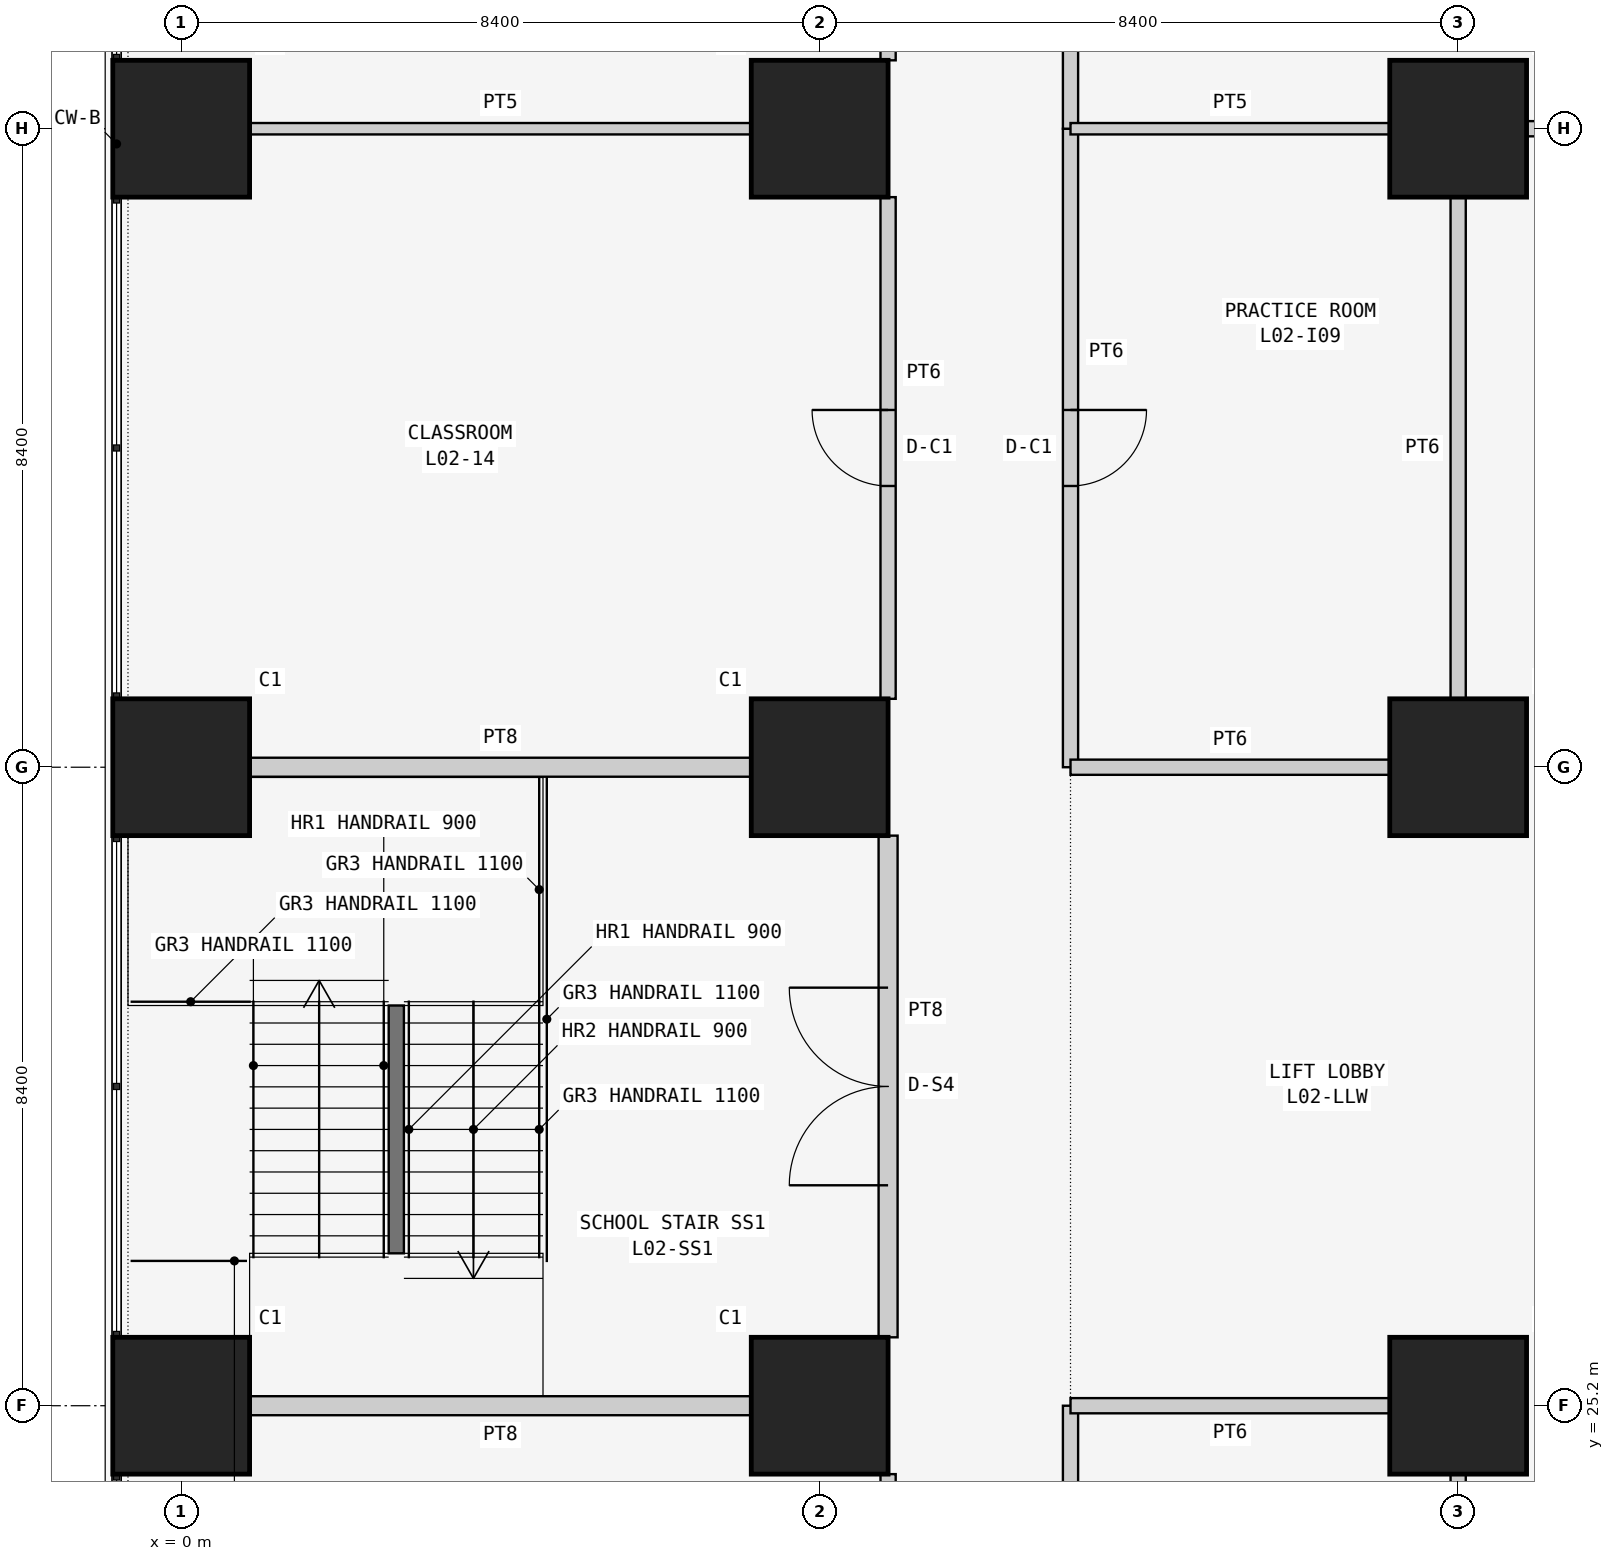
"""IFC4 building model, lengths in metres.
Left out: names, types, materials, properties, quantities, classifications, styles, units other than length and angle.
Written with IfcOpenShell. Run it as: python <this file> out.ifc"""

import sys

from ifc_helpers import new_model, si_unit, direction, frame, frame_2d, origin, origin_2d, place, context, subcontext, project, spatial, rectangle, extrude, element, fill, save


model = new_model("IFC4")
c1 = context("Model", 3, precision=1e-05, world=origin(), true_north=direction((0.0, 1.0)))
c2 = subcontext(c1, "Body", "Model", "MODEL_VIEW")
j1 = project(units=[si_unit("LENGTHUNIT", "METRE"), si_unit("PLANEANGLEUNIT", "RADIAN")], contexts=[c1])
p1 = place(None, origin())
s1 = spatial("IfcSite", under=j1, at=p1, CompositionType="ELEMENT")
p2 = place(p1, origin())
s2 = spatial("IfcBuilding", under=s1, at=p2, CompositionType="ELEMENT")
p3 = place(p2, frame((0.0, 0.0, 10.5)))
s3 = spatial("IfcBuildingStorey", under=s2, at=p3, CompositionType="ELEMENT", Elevation=10.5)
for number, where, z_axis, x_axis in (
    (1, (0.0, 25.2, 0.0), (0.0, 0.0, 1.0), (1.0, 0.0, 0.0)),
    (2, (0.0, 33.6, 0.0), (0.0, 0.0, 1.0), (1.0, 0.0, 0.0)),
    (3, (0.0, 42.0, 0.0), (0.0, 0.0, 1.0), (1.0, 0.0, 0.0)),
    (4, (8.4, 25.2, 0.0), (0.0, 0.0, 1.0), (1.0, 0.0, 0.0)),
    (5, (8.4, 33.6, 0.0), (0.0, 0.0, 1.0), (1.0, 0.0, 0.0)),
    (6, (8.4, 42.0, 0.0), (0.0, 0.0, 1.0), (1.0, 0.0, 0.0)),
    (7, (16.8, 25.2, 0.0), (0.0, 0.0, 1.0), (1.0, 0.0, 0.0)),
    (8, (16.8, 33.6, 0.0), (0.0, 0.0, 1.0), (1.0, 0.0, 0.0)),
    (9, (16.8, 42.0, 0.0), (0.0, 0.0, 1.0), (1.0, 0.0, 0.0)),
):
    element("IfcColumn", number, at=place(p3, frame(where, z_axis=z_axis, x_axis=x_axis)), inside=s3, PredefinedType="COLUMN", context=c2, shape_type="SweptSolid", body=[
        extrude(rectangle(XDim=1.8, YDim=1.8, at=origin_2d()), origin(), (0.0, 0.0, 1.0), 4.5),
    ])
for number, where, z_axis, x_axis in (
    (10, (7.5, 25.2, 0.0), (0.0, 0.0, 1.0), (-1.0, 0.0, 0.0)),
    (11, (0.9, 33.6, 0.0), (0.0, 0.0, 1.0), (1.0, 0.0, 0.0)),
):
    element("IfcWall", number, at=place(p3, frame(where, z_axis=z_axis, x_axis=x_axis)), inside=s3, PredefinedType="SOLIDWALL", context=c2, shape_type="SweptSolid", body=[
        extrude(rectangle(XDim=6.6, YDim=0.25, at=frame_2d((3.3, 0.0))), origin(), (0.0, 0.0, 1.0), 3.543),
    ])
p4 = place(p3, frame((9.3, 32.7, 0.0), z_axis=(0.0, 0.0, 1.0), x_axis=(0.0, -1.0, 0.0)))
e12 = element("IfcWall", 12, at=p4, inside=s3, PredefinedType="SOLIDWALL", context=c2, shape_type="SweptSolid", body=[
    extrude(rectangle(XDim=6.6, YDim=0.25, at=frame_2d((3.3, 0.0))), origin(), (0.0, 0.0, 1.0), 4.3),
])
p5 = place(p4, frame((2.0, 0.0, 0.0)))
e13 = element("IfcOpeningElement", 13, at=p5, cuts=e12, PredefinedType="OPENING", context=c2, shape_type="SweptSolid", body=[
    extrude(rectangle(XDim=2.6, YDim=2.4, at=frame_2d((1.3, 1.2))), frame((0.0, 0.135, 0.0), z_axis=(0.0, -1.0, 0.0), x_axis=(1.0, 0.0, 0.0)), (0.0, 0.0, 1.0), 0.27),
])
p6 = place(p3, frame((9.3, 24.3, 0.0), z_axis=(0.0, 0.0, 1.0), x_axis=(0.0, -1.0, 0.0)))
e14 = element("IfcWall", 14, at=p6, inside=s3, PredefinedType="PARTITIONING", context=c2, shape_type="SweptSolid", body=[
    extrude(rectangle(XDim=6.6, YDim=0.2, at=frame_2d((3.3, 0.0))), origin(), (0.0, 0.0, 1.0), 4.3),
])
p7 = place(p6, frame((2.8, 0.0, 0.0)))
e15 = element("IfcOpeningElement", 15, at=p7, cuts=e14, PredefinedType="OPENING", context=c2, shape_type="SweptSolid", body=[
    extrude(rectangle(XDim=1.0, YDim=2.1, at=frame_2d((0.5, 1.05))), frame((0.0, 0.11, 0.0), z_axis=(0.0, -1.0, 0.0), x_axis=(1.0, 0.0, 0.0)), (0.0, 0.0, 1.0), 0.22),
])
p8 = place(p3, frame((0.9, 42.0, 0.0), z_axis=(0.0, 0.0, 1.0), x_axis=(1.0, 0.0, 0.0)))
e16 = element("IfcWall", 16, at=p8, inside=s3, PredefinedType="PARTITIONING", context=c2, shape_type="SweptSolid", body=[
    extrude(rectangle(XDim=6.6, YDim=0.15, at=frame_2d((3.3, 0.0))), origin(), (0.0, 0.0, 1.0), 3.543),
])
p9 = place(p3, frame((9.3, 41.1, 0.0), z_axis=(0.0, 0.0, 1.0), x_axis=(0.0, -1.0, 0.0)))
e17 = element("IfcWall", 17, at=p9, inside=s3, PredefinedType="PARTITIONING", context=c2, shape_type="SweptSolid", body=[
    extrude(rectangle(XDim=6.6, YDim=0.2, at=frame_2d((3.3, 0.0))), origin(), (0.0, 0.0, 1.0), 4.3),
])
p10 = place(p9, frame((2.8, 0.0, 0.0)))
e18 = element("IfcOpeningElement", 18, at=p10, cuts=e17, PredefinedType="OPENING", context=c2, shape_type="SweptSolid", body=[
    extrude(rectangle(XDim=1.0, YDim=2.1, at=frame_2d((0.5, 1.05))), frame((0.0, 0.11, 0.0), z_axis=(0.0, -1.0, 0.0), x_axis=(1.0, 0.0, 0.0)), (0.0, 0.0, 1.0), 0.22),
])
p11 = place(p3, frame((9.3, 50.4, 0.0), z_axis=(0.0, 0.0, 1.0), x_axis=(0.0, -1.0, 0.0)))
e19 = element("IfcWall", 19, at=p11, inside=s3, PredefinedType="PARTITIONING", context=c2, shape_type="SweptSolid", body=[
    extrude(rectangle(XDim=7.5, YDim=0.2, at=frame_2d((3.75, 0.0))), origin(), (0.0, 0.0, 1.0), 4.3),
])
p12 = place(p11, frame((3.25, 0.0, 0.0)))
e20 = element("IfcOpeningElement", 20, at=p12, cuts=e19, PredefinedType="OPENING", context=c2, shape_type="SweptSolid", body=[
    extrude(rectangle(XDim=1.0, YDim=2.1, at=frame_2d((0.5, 1.05))), frame((0.0, 0.11, 0.0), z_axis=(0.0, -1.0, 0.0), x_axis=(1.0, 0.0, 0.0)), (0.0, 0.0, 1.0), 0.22),
])
p13 = place(p3, frame((11.7, 25.2, 0.0), z_axis=(0.0, 0.0, 1.0), x_axis=(0.0, -1.0, 0.0)))
e21 = element("IfcWall", 21, at=p13, inside=s3, PredefinedType="PARTITIONING", context=c2, shape_type="SweptSolid", body=[
    extrude(rectangle(XDim=8.4, YDim=0.2, at=frame_2d((4.2, 0.0))), origin(), (0.0, 0.0, 1.0), 4.3),
])
p14 = place(p13, frame((3.7, 0.0, 0.0)))
e22 = element("IfcOpeningElement", 22, at=p14, cuts=e21, PredefinedType="OPENING", context=c2, shape_type="SweptSolid", body=[
    extrude(rectangle(XDim=1.0, YDim=2.1, at=frame_2d((0.5, 1.05))), frame((0.0, 0.11, 0.0), z_axis=(0.0, -1.0, 0.0), x_axis=(1.0, 0.0, 0.0)), (0.0, 0.0, 1.0), 0.22),
])
p15 = place(p3, frame((11.7, 42.0, 0.0), z_axis=(0.0, 0.0, 1.0), x_axis=(0.0, -1.0, 0.0)))
e23 = element("IfcWall", 23, at=p15, inside=s3, PredefinedType="PARTITIONING", context=c2, shape_type="SweptSolid", body=[
    extrude(rectangle(XDim=8.4, YDim=0.2, at=frame_2d((4.2, 0.0))), origin(), (0.0, 0.0, 1.0), 4.3),
])
p16 = place(p15, frame((3.7, 0.0, 0.0)))
e24 = element("IfcOpeningElement", 24, at=p16, cuts=e23, PredefinedType="OPENING", context=c2, shape_type="SweptSolid", body=[
    extrude(rectangle(XDim=1.0, YDim=2.1, at=frame_2d((0.5, 1.05))), frame((0.0, 0.11, 0.0), z_axis=(0.0, -1.0, 0.0), x_axis=(1.0, 0.0, 0.0)), (0.0, 0.0, 1.0), 0.22),
])
p17 = place(p3, frame((11.7, 47.1, 0.0), z_axis=(0.0, 0.0, 1.0), x_axis=(0.0, -1.0, 0.0)))
e25 = element("IfcWall", 25, at=p17, inside=s3, PredefinedType="PARTITIONING", context=c2, shape_type="SweptSolid", body=[
    extrude(rectangle(XDim=5.1, YDim=0.2, at=frame_2d((2.55, 0.0))), origin(), (0.0, 0.0, 1.0), 4.3),
])
p18 = place(p3, frame((15.9, 25.2, 0.0), z_axis=(0.0, 0.0, 1.0), x_axis=(-1.0, 0.0, 0.0)))
e26 = element("IfcWall", 26, at=p18, inside=s3, PredefinedType="PARTITIONING", context=c2, shape_type="SweptSolid", body=[
    extrude(rectangle(XDim=4.2, YDim=0.2, at=frame_2d((2.1, 0.0))), origin(), (0.0, 0.0, 1.0), 3.543),
])
p19 = place(p3, frame((16.8, 17.7, 0.0), z_axis=(0.0, 0.0, 1.0), x_axis=(0.0, 1.0, 0.0)))
e27 = element("IfcWall", 27, at=p19, inside=s3, PredefinedType="PARTITIONING", context=c2, shape_type="SweptSolid", body=[
    extrude(rectangle(XDim=6.6, YDim=0.2, at=frame_2d((3.3, 0.0))), origin(), (0.0, 0.0, 1.0), 3.543),
])
p20 = place(p3, frame((11.7, 33.6, 0.0), z_axis=(0.0, 0.0, 1.0), x_axis=(1.0, 0.0, 0.0)))
e28 = element("IfcWall", 28, at=p20, inside=s3, PredefinedType="PARTITIONING", context=c2, shape_type="SweptSolid", body=[
    extrude(rectangle(XDim=4.2, YDim=0.2, at=frame_2d((2.1, 0.0))), origin(), (0.0, 0.0, 1.0), 3.543),
])
p21 = place(p3, frame((16.8, 34.5, 0.0), z_axis=(0.0, 0.0, 1.0), x_axis=(0.0, 1.0, 0.0)))
e29 = element("IfcWall", 29, at=p21, inside=s3, PredefinedType="PARTITIONING", context=c2, shape_type="SweptSolid", body=[
    extrude(rectangle(XDim=6.6, YDim=0.2, at=frame_2d((3.3, 0.0))), origin(), (0.0, 0.0, 1.0), 3.543),
])
p22 = place(p3, frame((17.7, 42.0, 0.0), z_axis=(0.0, 0.0, 1.0), x_axis=(1.0, 0.0, 0.0)))
e30 = element("IfcWall", 30, at=p22, inside=s3, PredefinedType="PARTITIONING", context=c2, shape_type="SweptSolid", body=[
    extrude(rectangle(XDim=2.8, YDim=0.2, at=frame_2d((1.4, 0.0))), origin(), (0.0, 0.0, 1.0), 3.543),
])
p23 = place(p3, frame((11.7, 42.0, 0.0), z_axis=(0.0, 0.0, 1.0), x_axis=(1.0, 0.0, 0.0)))
e31 = element("IfcWall", 31, at=p23, inside=s3, PredefinedType="PARTITIONING", context=c2, shape_type="SweptSolid", body=[
    extrude(rectangle(XDim=4.2, YDim=0.15, at=frame_2d((2.1, 0.0))), origin(), (0.0, 0.0, 1.0), 3.543),
])
p24 = place(p3, frame((2.83, 27.205, 0.0), z_axis=(0.0, 0.0, 1.0), x_axis=(0.0, 1.0, 0.0)))
e32 = element("IfcWall", 32, at=p24, inside=s3, PredefinedType="SOLIDWALL", context=c2, shape_type="SweptSolid", body=[
    extrude(rectangle(XDim=3.26, YDim=0.2, at=frame_2d((1.63, 0.0))), origin(), (0.0, 0.0, 1.0), 4.5),
])
p25 = place(p5, frame((2.6, 0.0, 0.0), z_axis=(0.0, 0.0, 1.0), x_axis=(-1.0, 0.0, 0.0)))
e33 = element("IfcDoor", 33, at=p25, inside=s3, OperationType="DOUBLE_DOOR_SINGLE_SWING", PredefinedType="DOOR", context=c2, shape_type="SweptSolid", body=[
    extrude(rectangle(XDim=2.6, YDim=2.4, at=frame_2d((1.3, 1.2))), frame((0.0, 0.025, 0.0), z_axis=(0.0, -1.0, 0.0), x_axis=(1.0, 0.0, 0.0)), (0.0, 0.0, 1.0), 0.05),
])
fill(e13, e33)
p26 = place(p10, frame((1.0, 0.0, 0.0), z_axis=(0.0, 0.0, 1.0), x_axis=(-1.0, 0.0, 0.0)))
e34 = element("IfcDoor", 34, at=p26, inside=s3, OperationType="SINGLE_SWING_RIGHT", PredefinedType="DOOR", context=c2, shape_type="SweptSolid", body=[
    extrude(rectangle(XDim=1.0, YDim=2.1, at=frame_2d((0.5, 1.05))), frame((0.0, 0.025, 0.0), z_axis=(0.0, -1.0, 0.0), x_axis=(1.0, 0.0, 0.0)), (0.0, 0.0, 1.0), 0.05),
])
fill(e18, e34)
p27 = place(p16, origin())
e35 = element("IfcDoor", 35, at=p27, inside=s3, OperationType="SINGLE_SWING_LEFT", PredefinedType="DOOR", context=c2, shape_type="SweptSolid", body=[
    extrude(rectangle(XDim=1.0, YDim=2.1, at=frame_2d((0.5, 1.05))), frame((0.0, 0.025, 0.0), z_axis=(0.0, -1.0, 0.0), x_axis=(1.0, 0.0, 0.0)), (0.0, 0.0, 1.0), 0.05),
])
fill(e24, e35)
save(model, sys.argv[1])
